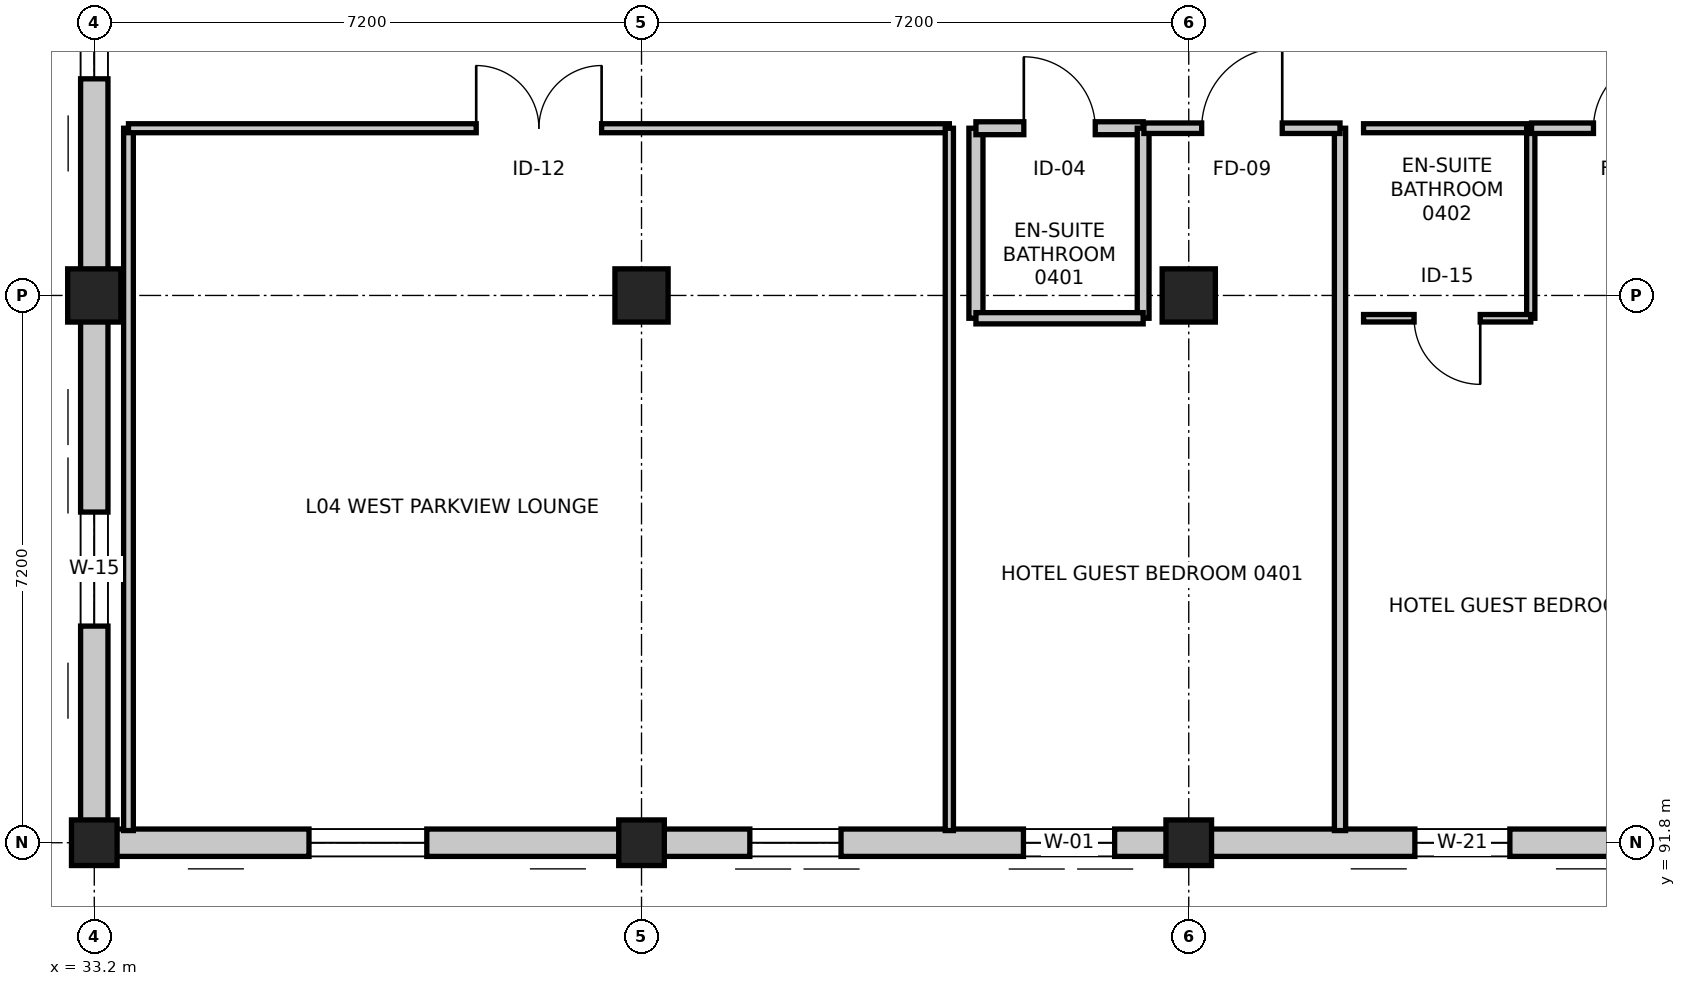
"""IFC4 building model, lengths in metres.
Left out: names, types, materials, properties, quantities, classifications, styles, units other than length and angle.
Written with IfcOpenShell. Run it as: python <this file> out.ifc"""

import sys

from ifc_helpers import new_model, si_unit, direction, frame, frame_2d, origin, origin_2d, place, context, subcontext, project, spatial, rectangle, extrude, element, fill, save


model = new_model("IFC4")
c1 = context("Model", 3, precision=1e-05, world=origin(), true_north=direction((0.0, 1.0)))
c2 = subcontext(c1, "Body", "Model", "MODEL_VIEW")
j1 = project(units=[si_unit("LENGTHUNIT", "METRE"), si_unit("PLANEANGLEUNIT", "RADIAN")], contexts=[c1])
p1 = place(None, origin())
s1 = spatial("IfcSite", under=j1, at=p1, CompositionType="ELEMENT")
p2 = place(p1, origin())
s2 = spatial("IfcBuilding", under=s1, at=p2, CompositionType="ELEMENT")
p3 = place(p2, frame((0.0, 0.0, 19.2)))
s3 = spatial("IfcBuildingStorey", under=s2, at=p3, CompositionType="ELEMENT", Elevation=19.2)
p4 = place(p3, frame((33.2, 91.8, 0.0), z_axis=(0.0, 0.0, 1.0), x_axis=(1.0, 0.0, 0.0)))
e1 = element("IfcColumn", 1, at=p4, inside=s3, PredefinedType="COLUMN", context=c2, shape_type="SweptSolid", body=[
    extrude(rectangle(XDim=0.6, YDim=0.6, at=origin_2d()), origin(), (0.0, 0.0, 1.0), 3.6),
])
p5 = place(p3, frame((33.2, 99.0, 0.0), z_axis=(0.0, 0.0, 1.0), x_axis=(1.0, 0.0, 0.0)))
e2 = element("IfcColumn", 2, at=p5, inside=s3, PredefinedType="COLUMN", context=c2, shape_type="SweptSolid", body=[
    extrude(rectangle(XDim=0.7, YDim=0.7, at=origin_2d()), origin(), (0.0, 0.0, 1.0), 3.6),
])
p6 = place(p3, frame((40.4, 91.8, 0.0), z_axis=(0.0, 0.0, 1.0), x_axis=(1.0, 0.0, 0.0)))
e3 = element("IfcColumn", 3, at=p6, inside=s3, PredefinedType="COLUMN", context=c2, shape_type="SweptSolid", body=[
    extrude(rectangle(XDim=0.6, YDim=0.6, at=origin_2d()), origin(), (0.0, 0.0, 1.0), 3.6),
])
p7 = place(p3, frame((40.4, 99.0, 0.0), z_axis=(0.0, 0.0, 1.0), x_axis=(1.0, 0.0, 0.0)))
e4 = element("IfcColumn", 4, at=p7, inside=s3, PredefinedType="COLUMN", context=c2, shape_type="SweptSolid", body=[
    extrude(rectangle(XDim=0.7, YDim=0.7, at=origin_2d()), origin(), (0.0, 0.0, 1.0), 3.6),
])
p8 = place(p3, frame((47.6, 91.8, 0.0), z_axis=(0.0, 0.0, 1.0), x_axis=(1.0, 0.0, 0.0)))
e5 = element("IfcColumn", 5, at=p8, inside=s3, PredefinedType="COLUMN", context=c2, shape_type="SweptSolid", body=[
    extrude(rectangle(XDim=0.6, YDim=0.6, at=origin_2d()), origin(), (0.0, 0.0, 1.0), 3.6),
])
p9 = place(p3, frame((47.6, 99.0, 0.0), z_axis=(0.0, 0.0, 1.0), x_axis=(1.0, 0.0, 0.0)))
e6 = element("IfcColumn", 6, at=p9, inside=s3, PredefinedType="COLUMN", context=c2, shape_type="SweptSolid", body=[
    extrude(rectangle(XDim=0.7, YDim=0.7, at=origin_2d()), origin(), (0.0, 0.0, 1.0), 3.6),
])
p10 = place(p3, frame((33.2, 91.8, 0.0), z_axis=(0.0, 0.0, 1.0), x_axis=(0.0, 1.0, 0.0)))
e7 = element("IfcWall", 7, at=p10, inside=s3, PredefinedType="STANDARD", context=c2, shape_type="SweptSolid", body=[
    extrude(rectangle(XDim=7.2, YDim=0.36, at=frame_2d((3.6, 0.0))), origin(), (0.0, 0.0, 1.0), 2.685),
])
p11 = place(p10, frame((2.85, 0.0, 0.75)))
e8 = element("IfcOpeningElement", 8, at=p11, cuts=e7, PredefinedType="OPENING", context=c2, shape_type="SweptSolid", body=[
    extrude(rectangle(XDim=1.5, YDim=1.5, at=frame_2d((0.75, 0.75))), frame((0.0, 0.19, 0.0), z_axis=(0.0, -1.0, 0.0), x_axis=(1.0, 0.0, 0.0)), (0.0, 0.0, 1.0), 0.38),
])
p12 = place(p3, frame((33.2, 99.0, 0.0), z_axis=(0.0, 0.0, 1.0), x_axis=(0.0, 1.0, 0.0)))
e9 = element("IfcWall", 9, at=p12, inside=s3, PredefinedType="STANDARD", context=c2, shape_type="SweptSolid", body=[
    extrude(rectangle(XDim=7.2, YDim=0.36, at=frame_2d((3.6, 0.0))), origin(), (0.0, 0.0, 1.0), 2.685),
])
p13 = place(p12, frame((2.85, 0.0, 0.75)))
e10 = element("IfcOpeningElement", 10, at=p13, cuts=e9, PredefinedType="OPENING", context=c2, shape_type="SweptSolid", body=[
    extrude(rectangle(XDim=1.5, YDim=1.5, at=frame_2d((0.75, 0.75))), frame((0.0, 0.19, 0.0), z_axis=(0.0, -1.0, 0.0), x_axis=(1.0, 0.0, 0.0)), (0.0, 0.0, 1.0), 0.38),
])
p14 = place(p3, frame((54.8, 91.8, 0.0), z_axis=(0.0, 0.0, 1.0), x_axis=(-1.0, 0.0, 0.0)))
e11 = element("IfcWall", 11, at=p14, inside=s3, PredefinedType="STANDARD", context=c2, shape_type="SweptSolid", body=[
    extrude(rectangle(XDim=7.2, YDim=0.36, at=frame_2d((3.6, 0.0))), origin(), (0.0, 0.0, 1.0), 2.735),
])
p15 = place(p14, frame((2.975, 0.0, 0.75)))
e12 = element("IfcOpeningElement", 12, at=p15, cuts=e11, PredefinedType="OPENING", context=c2, shape_type="SweptSolid", body=[
    extrude(rectangle(XDim=1.25, YDim=1.75, at=frame_2d((0.625, 0.875))), frame((0.0, 0.19, 0.0), z_axis=(0.0, -1.0, 0.0), x_axis=(1.0, 0.0, 0.0)), (0.0, 0.0, 1.0), 0.38),
])
p16 = place(p3, frame((47.6, 91.8, 0.0), z_axis=(0.0, 0.0, 1.0), x_axis=(-1.0, 0.0, 0.0)))
e13 = element("IfcWall", 13, at=p16, inside=s3, PredefinedType="STANDARD", context=c2, shape_type="SweptSolid", body=[
    extrude(rectangle(XDim=7.2, YDim=0.36, at=frame_2d((3.6, 0.0))), origin(), (0.0, 0.0, 1.0), 2.735),
])
p17 = place(p16, frame((0.975, 0.0, 0.75)))
e14 = element("IfcOpeningElement", 14, at=p17, cuts=e13, PredefinedType="OPENING", context=c2, shape_type="SweptSolid", body=[
    extrude(rectangle(XDim=1.2, YDim=1.75, at=frame_2d((0.6, 0.875))), frame((0.0, 0.19, 0.0), z_axis=(0.0, -1.0, 0.0), x_axis=(1.0, 0.0, 0.0)), (0.0, 0.0, 1.0), 0.38),
])
p18 = place(p16, frame((4.575, 0.0, 0.75)))
e15 = element("IfcOpeningElement", 15, at=p18, cuts=e13, PredefinedType="OPENING", context=c2, shape_type="SweptSolid", body=[
    extrude(rectangle(XDim=1.2, YDim=1.75, at=frame_2d((0.6, 0.875))), frame((0.0, 0.19, 0.0), z_axis=(0.0, -1.0, 0.0), x_axis=(1.0, 0.0, 0.0)), (0.0, 0.0, 1.0), 0.38),
])
p19 = place(p3, frame((40.4, 91.8, 0.0), z_axis=(0.0, 0.0, 1.0), x_axis=(-1.0, 0.0, 0.0)))
e16 = element("IfcWall", 16, at=p19, inside=s3, PredefinedType="STANDARD", context=c2, shape_type="SweptSolid", body=[
    extrude(rectangle(XDim=7.2, YDim=0.36, at=frame_2d((3.6, 0.0))), origin(), (0.0, 0.0, 1.0), 2.735),
])
p20 = place(p19, frame((2.825, 0.0, 0.75)))
e17 = element("IfcOpeningElement", 17, at=p20, cuts=e16, PredefinedType="OPENING", context=c2, shape_type="SweptSolid", body=[
    extrude(rectangle(XDim=1.55, YDim=1.75, at=frame_2d((0.775, 0.875))), frame((0.0, 0.19, 0.0), z_axis=(0.0, -1.0, 0.0), x_axis=(1.0, 0.0, 0.0)), (0.0, 0.0, 1.0), 0.38),
])
p21 = place(p3, frame((33.65, 91.96, 0.0), z_axis=(0.0, 0.0, 1.0), x_axis=(0.0, 1.0, 0.0)))
e18 = element("IfcWall", 18, at=p21, inside=s3, PredefinedType="PARTITIONING", context=c2, shape_type="SweptSolid", body=[
    extrude(rectangle(XDim=9.24, YDim=0.128, at=frame_2d((4.62, 0.0))), origin(), (0.0, 0.0, 1.0), 2.735),
])
p22 = place(p3, frame((33.65, 101.2, 0.0), z_axis=(0.0, 0.0, 1.0), x_axis=(1.0, 0.0, 0.0)))
e19 = element("IfcWall", 19, at=p22, inside=s3, PredefinedType="PARTITIONING", context=c2, shape_type="SweptSolid", body=[
    extrude(rectangle(XDim=10.8, YDim=0.118, at=frame_2d((5.4, 0.0))), origin(), (0.0, 0.0, 1.0), 2.685),
])
p23 = place(p22, frame((4.575, 0.0, 0.0)))
e20 = element("IfcOpeningElement", 20, at=p23, cuts=e19, PredefinedType="OPENING", context=c2, shape_type="SweptSolid", body=[
    extrude(rectangle(XDim=1.65, YDim=2.25, at=frame_2d((0.825, 1.125))), frame((0.0, 0.069, 0.0), z_axis=(0.0, -1.0, 0.0), x_axis=(1.0, 0.0, 0.0)), (0.0, 0.0, 1.0), 0.138),
])
p24 = place(p3, frame((44.45, 101.2, 0.0), z_axis=(0.0, 0.0, 1.0), x_axis=(0.0, -1.0, 0.0)))
e21 = element("IfcWall", 21, at=p24, inside=s3, PredefinedType="PARTITIONING", context=c2, shape_type="SweptSolid", body=[
    extrude(rectangle(XDim=9.24, YDim=0.108, at=frame_2d((4.62, 0.0))), origin(), (0.0, 0.0, 1.0), 2.735),
])
p25 = place(p3, frame((44.8, 98.7, 0.0), z_axis=(0.0, 0.0, 1.0), x_axis=(0.0, 1.0, 0.0)))
e22 = element("IfcWall", 22, at=p25, inside=s3, PredefinedType="PARTITIONING", context=c2, shape_type="SweptSolid", body=[
    extrude(rectangle(XDim=2.5, YDim=0.185, at=frame_2d((1.25, 0.0))), origin(), (0.0, 0.0, 1.0), 2.735),
])
p26 = place(p3, frame((44.8, 101.2, 0.0), z_axis=(0.0, 0.0, 1.0), x_axis=(1.0, 0.0, 0.0)))
e23 = element("IfcWall", 23, at=p26, inside=s3, PredefinedType="PARTITIONING", context=c2, shape_type="SweptSolid", body=[
    extrude(rectangle(XDim=2.2, YDim=0.17, at=frame_2d((1.1, 0.0))), origin(), (0.0, 0.0, 1.0), 3.35),
])
p27 = place(p26, frame((0.63, 0.0, 0.0)))
e24 = element("IfcOpeningElement", 24, at=p27, cuts=e23, PredefinedType="OPENING", context=c2, shape_type="SweptSolid", body=[
    extrude(rectangle(XDim=0.94, YDim=2.12, at=frame_2d((0.47, 1.06))), frame((0.0, 0.095, 0.0), z_axis=(0.0, -1.0, 0.0), x_axis=(1.0, 0.0, 0.0)), (0.0, 0.0, 1.0), 0.19),
])
p28 = place(p3, frame((47.0, 101.2, 0.0), z_axis=(0.0, 0.0, 1.0), x_axis=(0.0, -1.0, 0.0)))
e25 = element("IfcWall", 25, at=p28, inside=s3, PredefinedType="PARTITIONING", context=c2, shape_type="SweptSolid", body=[
    extrude(rectangle(XDim=2.5, YDim=0.155, at=frame_2d((1.25, 0.0))), origin(), (0.0, 0.0, 1.0), 2.735),
])
p29 = place(p3, frame((47.0, 98.7, 0.0), z_axis=(0.0, 0.0, 1.0), x_axis=(-1.0, 0.0, 0.0)))
e26 = element("IfcWall", 26, at=p29, inside=s3, PredefinedType="PARTITIONING", context=c2, shape_type="SweptSolid", body=[
    extrude(rectangle(XDim=2.2, YDim=0.148, at=frame_2d((1.1, 0.0))), origin(), (0.0, 0.0, 1.0), 3.35),
])
p30 = place(p3, frame((49.59, 101.2, 0.0), z_axis=(0.0, 0.0, 1.0), x_axis=(0.0, -1.0, 0.0)))
e27 = element("IfcWall", 27, at=p30, inside=s3, PredefinedType="PARTITIONING", context=c2, shape_type="SweptSolid", body=[
    extrude(rectangle(XDim=9.24, YDim=0.148, at=frame_2d((4.62, 0.0))), origin(), (0.0, 0.0, 1.0), 2.735),
])
p31 = place(p3, frame((47.01, 101.2, 0.0), z_axis=(0.0, 0.0, 1.0), x_axis=(1.0, 0.0, 0.0)))
e28 = element("IfcWall", 28, at=p31, inside=s3, PredefinedType="PARTITIONING", context=c2, shape_type="SweptSolid", body=[
    extrude(rectangle(XDim=2.58, YDim=0.138, at=frame_2d((1.29, 0.0))), origin(), (0.0, 0.0, 1.0), 2.685),
])
p32 = place(p31, frame((0.76, 0.0, 0.0)))
e29 = element("IfcOpeningElement", 29, at=p32, cuts=e28, PredefinedType="OPENING", context=c2, shape_type="SweptSolid", body=[
    extrude(rectangle(XDim=1.06, YDim=2.2, at=frame_2d((0.53, 1.1))), frame((0.0, 0.079, 0.0), z_axis=(0.0, -1.0, 0.0), x_axis=(1.0, 0.0, 0.0)), (0.0, 0.0, 1.0), 0.158),
])
p33 = place(p3, frame((49.9, 101.2, 0.0), z_axis=(0.0, 0.0, 1.0), x_axis=(1.0, 0.0, 0.0)))
e30 = element("IfcWall", 30, at=p33, inside=s3, PredefinedType="PARTITIONING", context=c2, shape_type="SweptSolid", body=[
    extrude(rectangle(XDim=2.2, YDim=0.118, at=frame_2d((1.1, 0.0))), origin(), (0.0, 0.0, 1.0), 3.35),
])
p34 = place(p3, frame((52.1, 101.2, 0.0), z_axis=(0.0, 0.0, 1.0), x_axis=(0.0, -1.0, 0.0)))
e31 = element("IfcWall", 31, at=p34, inside=s3, PredefinedType="PARTITIONING", context=c2, shape_type="SweptSolid", body=[
    extrude(rectangle(XDim=2.5, YDim=0.108, at=frame_2d((1.25, 0.0))), origin(), (0.0, 0.0, 1.0), 2.735),
])
p35 = place(p3, frame((52.1, 98.7, 0.0), z_axis=(0.0, 0.0, 1.0), x_axis=(-1.0, 0.0, 0.0)))
e32 = element("IfcWall", 32, at=p35, inside=s3, PredefinedType="PARTITIONING", context=c2, shape_type="SweptSolid", body=[
    extrude(rectangle(XDim=2.2, YDim=0.098, at=frame_2d((1.1, 0.0))), origin(), (0.0, 0.0, 1.0), 3.35),
])
p36 = place(p35, frame((0.665, 0.0, 0.0)))
e33 = element("IfcOpeningElement", 33, at=p36, cuts=e32, PredefinedType="OPENING", context=c2, shape_type="SweptSolid", body=[
    extrude(rectangle(XDim=0.87, YDim=2.07, at=frame_2d((0.435, 1.035))), frame((0.0, 0.059, 0.0), z_axis=(0.0, -1.0, 0.0), x_axis=(1.0, 0.0, 0.0)), (0.0, 0.0, 1.0), 0.118),
])
p37 = place(p3, frame((52.11, 101.2, 0.0), z_axis=(0.0, 0.0, 1.0), x_axis=(1.0, 0.0, 0.0)))
e34 = element("IfcWall", 34, at=p37, inside=s3, PredefinedType="PARTITIONING", context=c2, shape_type="SweptSolid", body=[
    extrude(rectangle(XDim=2.58, YDim=0.138, at=frame_2d((1.29, 0.0))), origin(), (0.0, 0.0, 1.0), 2.685),
])
p38 = place(p37, frame((0.815, 0.0, 0.0)))
e35 = element("IfcOpeningElement", 35, at=p38, cuts=e34, PredefinedType="OPENING", context=c2, shape_type="SweptSolid", body=[
    extrude(rectangle(XDim=0.95, YDim=2.1, at=frame_2d((0.475, 1.05))), frame((0.0, 0.079, 0.0), z_axis=(0.0, -1.0, 0.0), x_axis=(1.0, 0.0, 0.0)), (0.0, 0.0, 1.0), 0.158),
])
p39 = place(p11, origin())
e36 = element("IfcWindow", 36, at=p39, inside=s3, PartitioningType="SINGLE_PANEL", PredefinedType="WINDOW", context=c2, shape_type="SweptSolid", body=[
    extrude(rectangle(XDim=1.5, YDim=1.5, at=frame_2d((0.75, 0.75))), frame((0.0, 0.03, 0.0), z_axis=(0.0, -1.0, 0.0), x_axis=(1.0, 0.0, 0.0)), (0.0, 0.0, 1.0), 0.06),
])
fill(e8, e36)
p40 = place(p13, origin())
e37 = element("IfcWindow", 37, at=p40, inside=s3, PartitioningType="SINGLE_PANEL", PredefinedType="WINDOW", context=c2, shape_type="SweptSolid", body=[
    extrude(rectangle(XDim=1.5, YDim=1.5, at=frame_2d((0.75, 0.75))), frame((0.0, 0.03, 0.0), z_axis=(0.0, -1.0, 0.0), x_axis=(1.0, 0.0, 0.0)), (0.0, 0.0, 1.0), 0.06),
])
fill(e10, e37)
p41 = place(p15, origin())
e38 = element("IfcWindow", 38, at=p41, inside=s3, PartitioningType="SINGLE_PANEL", PredefinedType="WINDOW", context=c2, shape_type="SweptSolid", body=[
    extrude(rectangle(XDim=1.25, YDim=1.75, at=frame_2d((0.625, 0.875))), frame((0.0, 0.03, 0.0), z_axis=(0.0, -1.0, 0.0), x_axis=(1.0, 0.0, 0.0)), (0.0, 0.0, 1.0), 0.06),
])
fill(e12, e38)
p42 = place(p17, origin())
e39 = element("IfcWindow", 39, at=p42, inside=s3, PartitioningType="SINGLE_PANEL", PredefinedType="WINDOW", context=c2, shape_type="SweptSolid", body=[
    extrude(rectangle(XDim=1.2, YDim=1.75, at=frame_2d((0.6, 0.875))), frame((0.0, 0.03, 0.0), z_axis=(0.0, -1.0, 0.0), x_axis=(1.0, 0.0, 0.0)), (0.0, 0.0, 1.0), 0.06),
])
fill(e14, e39)
p43 = place(p20, origin())
e40 = element("IfcWindow", 40, at=p43, inside=s3, PartitioningType="SINGLE_PANEL", PredefinedType="WINDOW", context=c2, shape_type="SweptSolid", body=[
    extrude(rectangle(XDim=1.55, YDim=1.75, at=frame_2d((0.775, 0.875))), frame((0.0, 0.03, 0.0), z_axis=(0.0, -1.0, 0.0), x_axis=(1.0, 0.0, 0.0)), (0.0, 0.0, 1.0), 0.06),
])
fill(e17, e40)
p44 = place(p23, origin())
e41 = element("IfcDoor", 41, at=p44, inside=s3, OperationType="DOUBLE_DOOR_SINGLE_SWING", PredefinedType="DOOR", context=c2, shape_type="SweptSolid", body=[
    extrude(rectangle(XDim=1.65, YDim=2.25, at=frame_2d((0.825, 1.125))), frame((0.0, 0.025, 0.0), z_axis=(0.0, -1.0, 0.0), x_axis=(1.0, 0.0, 0.0)), (0.0, 0.0, 1.0), 0.05),
])
fill(e20, e41)
p45 = place(p27, origin())
e42 = element("IfcDoor", 42, at=p45, inside=s3, OperationType="SINGLE_SWING_LEFT", PredefinedType="DOOR", context=c2, shape_type="SweptSolid", body=[
    extrude(rectangle(XDim=0.94, YDim=2.12, at=frame_2d((0.47, 1.06))), frame((0.0, 0.025, 0.0), z_axis=(0.0, -1.0, 0.0), x_axis=(1.0, 0.0, 0.0)), (0.0, 0.0, 1.0), 0.05),
])
fill(e24, e42)
p46 = place(p32, origin())
e43 = element("IfcDoor", 43, at=p46, inside=s3, OperationType="SINGLE_SWING_RIGHT", PredefinedType="DOOR", context=c2, shape_type="SweptSolid", body=[
    extrude(rectangle(XDim=1.06, YDim=2.2, at=frame_2d((0.53, 1.1))), frame((0.0, 0.025, 0.0), z_axis=(0.0, -1.0, 0.0), x_axis=(1.0, 0.0, 0.0)), (0.0, 0.0, 1.0), 0.05),
])
fill(e29, e43)
p47 = place(p36, origin())
e44 = element("IfcDoor", 44, at=p47, inside=s3, OperationType="SINGLE_SWING_LEFT", PredefinedType="DOOR", context=c2, shape_type="SweptSolid", body=[
    extrude(rectangle(XDim=0.87, YDim=2.07, at=frame_2d((0.435, 1.035))), frame((0.0, 0.025, 0.0), z_axis=(0.0, -1.0, 0.0), x_axis=(1.0, 0.0, 0.0)), (0.0, 0.0, 1.0), 0.05),
])
fill(e33, e44)
p48 = place(p38, origin())
e45 = element("IfcDoor", 45, at=p48, inside=s3, OperationType="SINGLE_SWING_RIGHT", PredefinedType="DOOR", context=c2, shape_type="SweptSolid", body=[
    extrude(rectangle(XDim=0.95, YDim=2.1, at=frame_2d((0.475, 1.05))), frame((0.0, 0.025, 0.0), z_axis=(0.0, -1.0, 0.0), x_axis=(1.0, 0.0, 0.0)), (0.0, 0.0, 1.0), 0.05),
])
fill(e35, e45)
p49 = place(p18, origin())
e46 = element("IfcWindow", 46, at=p49, inside=s3, PartitioningType="SINGLE_PANEL", PredefinedType="WINDOW", context=c2, shape_type="SweptSolid", body=[
    extrude(rectangle(XDim=1.2, YDim=1.75, at=frame_2d((0.6, 0.875))), frame((0.0, 0.03, 0.0), z_axis=(0.0, -1.0, 0.0), x_axis=(1.0, 0.0, 0.0)), (0.0, 0.0, 1.0), 0.06),
])
fill(e15, e46)
save(model, sys.argv[1])
